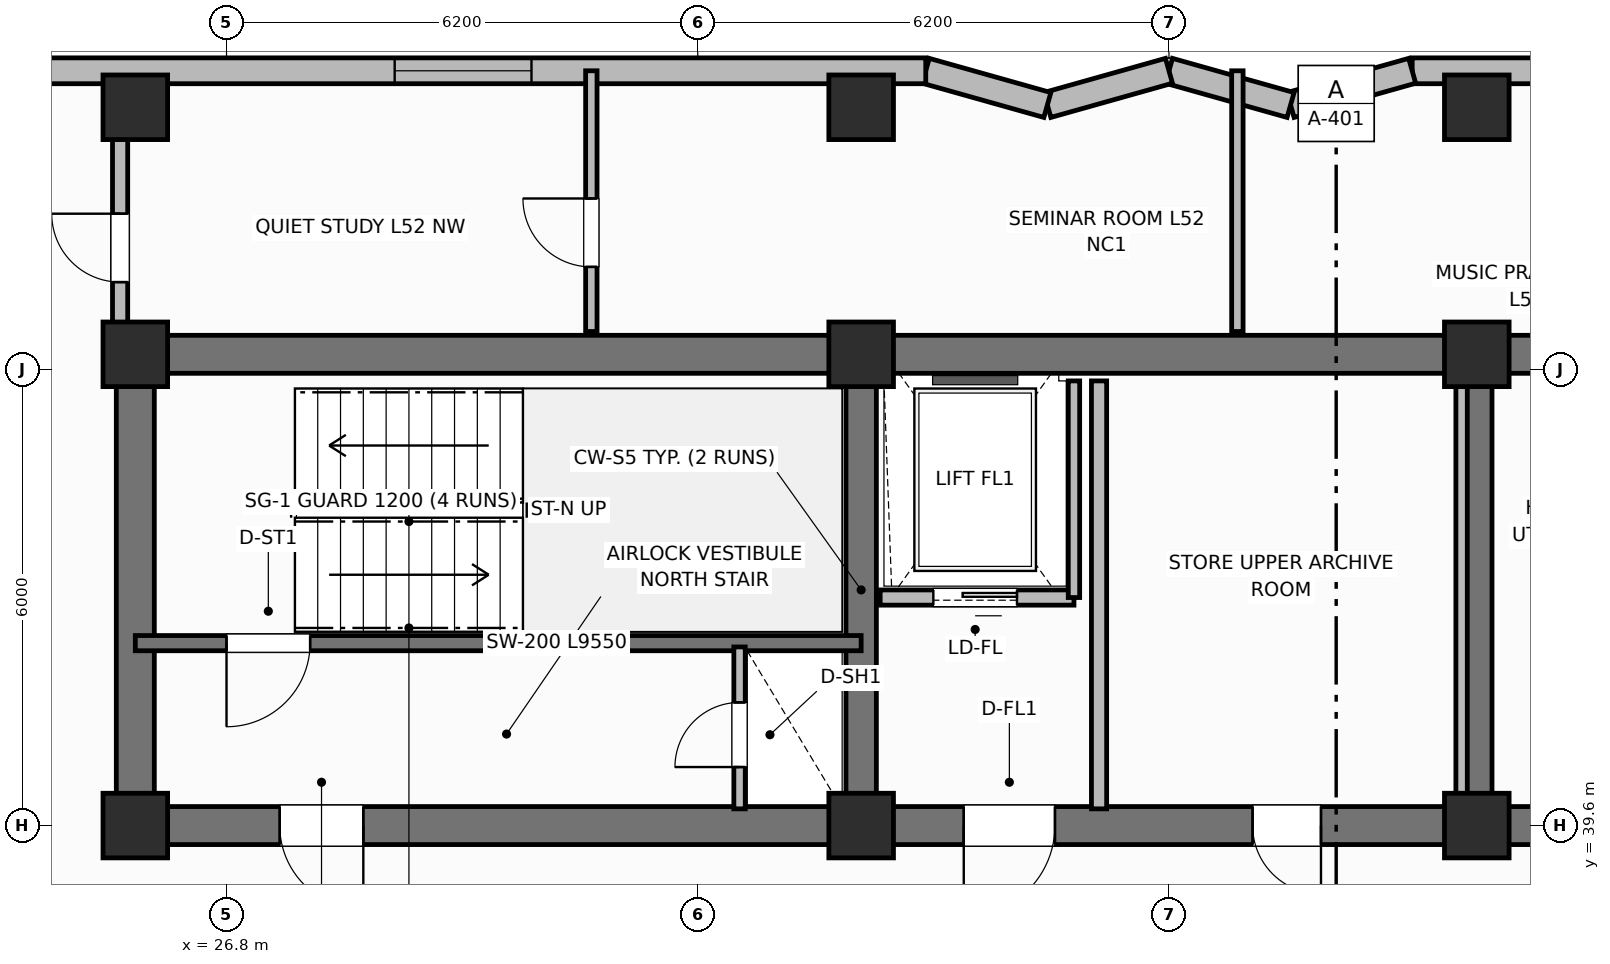
"""IFC4 building model, lengths in metres.
Left out: names, types, materials, properties, quantities, classifications, styles, units other than length and angle.
Written with IfcOpenShell. Run it as: python <this file> out.ifc"""

import sys

from ifc_helpers import new_model, si_unit, direction, frame, frame_2d, origin, origin_2d, place, context, subcontext, project, spatial, rectangle, extrude, element, fill, save


model = new_model("IFC4")
c1 = context("Model", 3, precision=1e-05, world=origin(), true_north=direction((0.0, 1.0)))
c2 = subcontext(c1, "Body", "Model", "MODEL_VIEW")
j1 = project(units=[si_unit("LENGTHUNIT", "METRE"), si_unit("PLANEANGLEUNIT", "RADIAN")], contexts=[c1])
p1 = place(None, origin())
s1 = spatial("IfcSite", under=j1, at=p1, CompositionType="ELEMENT")
p2 = place(p1, origin())
s2 = spatial("IfcBuilding", under=s1, at=p2, CompositionType="ELEMENT")
p3 = place(p2, frame((0.0, 0.0, 211.0)))
s3 = spatial("IfcBuildingStorey", under=s2, at=p3, CompositionType="ELEMENT", Elevation=211.0)
p4 = place(p3, frame((25.6, 45.8, 0.0), z_axis=(0.0, 0.0, 1.0), x_axis=(1.0, 0.0, 0.0)))
e1 = element("IfcWall", 1, at=p4, inside=s3, PredefinedType="SHEAR", context=c2, shape_type="SweptSolid", body=[
    extrude(rectangle(XDim=27.2, YDim=0.5, at=frame_2d((13.6, 0.0))), origin(), (0.0, 0.0, 1.0), 3.7),
])
p5 = place(p3, frame((25.6, 39.85, 0.0), z_axis=(0.0, 0.0, 1.0), x_axis=(0.0, 1.0, 0.0)))
e2 = element("IfcWall", 2, at=p5, inside=s3, PredefinedType="SHEAR", context=c2, shape_type="SweptSolid", body=[
    extrude(rectangle(XDim=5.7, YDim=0.5, at=frame_2d((2.85, 0.0))), origin(), (0.0, 0.0, 1.0), 3.7),
])
p6 = place(p3, frame((52.8, 39.6, 0.0), z_axis=(0.0, 0.0, 1.0), x_axis=(-1.0, 0.0, 0.0)))
e3 = element("IfcWall", 3, at=p6, inside=s3, PredefinedType="SHEAR", context=c2, shape_type="SweptSolid", body=[
    extrude(rectangle(XDim=27.2, YDim=0.5, at=frame_2d((13.6, 0.0))), origin(), (0.0, 0.0, 1.0), 3.7),
])
p7 = place(p6, frame((24.2, 0.0, 0.0)))
e4 = element("IfcOpeningElement", 4, at=p7, cuts=e3, PredefinedType="OPENING", context=c2, shape_type="SweptSolid", body=[
    extrude(rectangle(XDim=1.1, YDim=2.15, at=frame_2d((0.55, 1.075))), frame((0.0, 0.26, 0.0), z_axis=(0.0, -1.0, 0.0), x_axis=(1.0, 0.0, 0.0)), (0.0, 0.0, 1.0), 0.52),
])
p8 = place(p6, frame((15.1, 0.0, 0.0)))
e5 = element("IfcOpeningElement", 5, at=p8, cuts=e3, PredefinedType="OPENING", context=c2, shape_type="SweptSolid", body=[
    extrude(rectangle(XDim=1.2, YDim=2.15, at=frame_2d((0.6, 1.075))), frame((0.0, 0.26, 0.0), z_axis=(0.0, -1.0, 0.0), x_axis=(1.0, 0.0, 0.0)), (0.0, 0.0, 1.0), 0.52),
])
p9 = place(p6, frame((11.6, 0.0, 0.0)))
e6 = element("IfcOpeningElement", 6, at=p9, cuts=e3, PredefinedType="OPENING", context=c2, shape_type="SweptSolid", body=[
    extrude(rectangle(XDim=0.9, YDim=2.1, at=frame_2d((0.45, 1.05))), frame((0.0, 0.26, 0.0), z_axis=(0.0, -1.0, 0.0), x_axis=(1.0, 0.0, 0.0)), (0.0, 0.0, 1.0), 0.52),
])
p10 = place(p6, frame((7.35, 0.0, 0.0)))
e7 = element("IfcOpeningElement", 7, at=p10, cuts=e3, PredefinedType="OPENING", context=c2, shape_type="SweptSolid", body=[
    extrude(rectangle(XDim=0.85, YDim=2.1, at=frame_2d((0.425, 1.05))), frame((0.0, 0.26, 0.0), z_axis=(0.0, -1.0, 0.0), x_axis=(1.0, 0.0, 0.0)), (0.0, 0.0, 1.0), 0.52),
])
p11 = place(p6, frame((4.2, 0.0, 0.0)))
e8 = element("IfcOpeningElement", 8, at=p11, cuts=e3, PredefinedType="OPENING", context=c2, shape_type="SweptSolid", body=[
    extrude(rectangle(XDim=1.3, YDim=2.2, at=frame_2d((0.65, 1.1))), frame((0.0, 0.26, 0.0), z_axis=(0.0, -1.0, 0.0), x_axis=(1.0, 0.0, 0.0)), (0.0, 0.0, 1.0), 0.52),
])
for number, where, z_axis, x_axis in (
    (9, (35.15, 39.85, 0.0), (0.0, 0.0, 1.0), (0.0, 1.0, 0.0)),
    (10, (43.25, 39.85, 0.0), (0.0, 0.0, 1.0), (0.0, 1.0, 0.0)),
):
    element("IfcWall", number, at=place(p3, frame(where, z_axis=z_axis, x_axis=x_axis)), inside=s3, PredefinedType="SHEAR", context=c2, shape_type="SweptSolid", body=[
        extrude(rectangle(XDim=5.7, YDim=0.4, at=frame_2d((2.85, 0.0))), origin(), (0.0, 0.0, 1.0), 3.7),
    ])
for number, where, z_axis, x_axis in (
    (11, (25.6, 39.6, 0.0), (0.0, 0.0, 1.0), (1.0, 0.0, 0.0)),
    (12, (25.6, 45.8, 0.0), (0.0, 0.0, 1.0), (1.0, 0.0, 0.0)),
    (13, (35.15, 39.6, 0.0), (0.0, 0.0, 1.0), (1.0, 0.0, 0.0)),
    (14, (35.15, 45.8, 0.0), (0.0, 0.0, 1.0), (1.0, 0.0, 0.0)),
    (15, (43.25, 39.6, 0.0), (0.0, 0.0, 1.0), (1.0, 0.0, 0.0)),
    (16, (43.25, 45.8, 0.0), (0.0, 0.0, 1.0), (1.0, 0.0, 0.0)),
    (17, (25.6, 49.05, 0.0), (0.0, 0.0, 1.0), (1.0, 0.0, 0.0)),
    (18, (35.15, 49.05, 0.0), (0.0, 0.0, 1.0), (1.0, 0.0, 0.0)),
    (19, (43.25, 49.05, 0.0), (0.0, 0.0, 1.0), (1.0, 0.0, 0.0)),
):
    element("IfcColumn", number, at=place(p3, frame(where, z_axis=z_axis, x_axis=x_axis)), inside=s3, PredefinedType="COLUMN", context=c2, shape_type="SweptSolid", body=[
        extrude(rectangle(XDim=0.85, YDim=0.85, at=origin_2d()), origin(), (0.0, 0.0, 1.0), 3.7),
    ])
p12 = place(p3, frame((58.2, 49.53, 0.0), z_axis=(0.0, 0.0, 1.0), x_axis=(-1.0, 0.0, 0.0)))
e20 = element("IfcWall", 20, at=p12, inside=s3, PredefinedType="SOLIDWALL", context=c2, shape_type="SweptSolid", body=[
    extrude(rectangle(XDim=15.8, YDim=0.34, at=frame_2d((7.9, 0.0))), origin(), (0.0, 0.0, 1.0), 2.72),
])
p13 = place(p12, frame((0.863, 0.0, 0.75)))
e21 = element("IfcOpeningElement", 21, at=p13, cuts=e20, PredefinedType="OPENING", context=c2, shape_type="SweptSolid", body=[
    extrude(rectangle(XDim=1.8, YDim=1.85, at=frame_2d((0.9, 0.925))), frame((0.0, 0.18, 0.0), z_axis=(0.0, -1.0, 0.0), x_axis=(1.0, 0.0, 0.0)), (0.0, 0.0, 1.0), 0.36),
])
p14 = place(p12, frame((8.462, 0.0, 0.75)))
e22 = element("IfcOpeningElement", 22, at=p14, cuts=e20, PredefinedType="OPENING", context=c2, shape_type="SweptSolid", body=[
    extrude(rectangle(XDim=1.8, YDim=1.85, at=frame_2d((0.9, 0.925))), frame((0.0, 0.18, 0.0), z_axis=(0.0, -1.0, 0.0), x_axis=(1.0, 0.0, 0.0)), (0.0, 0.0, 1.0), 0.36),
])
p15 = place(p12, frame((11.738, 0.0, 0.75)))
e23 = element("IfcOpeningElement", 23, at=p15, cuts=e20, PredefinedType="OPENING", context=c2, shape_type="SweptSolid", body=[
    extrude(rectangle(XDim=1.8, YDim=1.85, at=frame_2d((0.9, 0.925))), frame((0.0, 0.18, 0.0), z_axis=(0.0, -1.0, 0.0), x_axis=(1.0, 0.0, 0.0)), (0.0, 0.0, 1.0), 0.36),
])
p16 = place(p3, frame((42.4, 49.53, 0.0), z_axis=(0.0, 0.0, 1.0), x_axis=(-0.962652136636, -0.270741322725, 0.0)))
e24 = element("IfcWall", 24, at=p16, inside=s3, PredefinedType="SOLIDWALL", context=c2, shape_type="SweptSolid", body=[
    extrude(rectangle(XDim=1.662, YDim=0.34, at=frame_2d((0.831, 0.0))), origin(), (0.0, 0.0, 1.0), 2.72),
])
p17 = place(p3, frame((40.8, 49.08, 0.0), z_axis=(0.0, 0.0, 1.0), x_axis=(-0.962662902433, 0.270703040766, 0.0)))
e25 = element("IfcWall", 25, at=p17, inside=s3, PredefinedType="SOLIDWALL", context=c2, shape_type="SweptSolid", body=[
    extrude(rectangle(XDim=1.662, YDim=0.34, at=frame_2d((0.831, 0.0))), origin(), (0.0, 0.0, 1.0), 2.72),
])
p18 = place(p3, frame((39.2, 49.53, 0.0), z_axis=(0.0, 0.0, 1.0), x_axis=(-0.962652136636, -0.270741322725, 0.0)))
e26 = element("IfcWall", 26, at=p18, inside=s3, PredefinedType="SOLIDWALL", context=c2, shape_type="SweptSolid", body=[
    extrude(rectangle(XDim=1.662, YDim=0.34, at=frame_2d((0.831, 0.0))), origin(), (0.0, 0.0, 1.0), 2.72),
])
p19 = place(p3, frame((37.6, 49.08, 0.0), z_axis=(0.0, 0.0, 1.0), x_axis=(-0.962662902433, 0.270703040766, 0.0)))
e27 = element("IfcWall", 27, at=p19, inside=s3, PredefinedType="SOLIDWALL", context=c2, shape_type="SweptSolid", body=[
    extrude(rectangle(XDim=1.662, YDim=0.34, at=frame_2d((0.831, 0.0))), origin(), (0.0, 0.0, 1.0), 2.72),
])
p20 = place(p3, frame((36.0, 49.53, 0.0), z_axis=(0.0, 0.0, 1.0), x_axis=(-1.0, 0.0, 0.0)))
e28 = element("IfcWall", 28, at=p20, inside=s3, PredefinedType="SOLIDWALL", context=c2, shape_type="SweptSolid", body=[
    extrude(rectangle(XDim=15.8, YDim=0.34, at=frame_2d((7.9, 0.0))), origin(), (0.0, 0.0, 1.0), 2.72),
])
p21 = place(p20, frame((5.188, 0.0, 0.75)))
e29 = element("IfcOpeningElement", 29, at=p21, cuts=e28, PredefinedType="OPENING", context=c2, shape_type="SweptSolid", body=[
    extrude(rectangle(XDim=1.8, YDim=1.85, at=frame_2d((0.9, 0.925))), frame((0.0, 0.18, 0.0), z_axis=(0.0, -1.0, 0.0), x_axis=(1.0, 0.0, 0.0)), (0.0, 0.0, 1.0), 0.36),
])
p22 = place(p20, frame((13.137, 0.0, 0.75)))
e30 = element("IfcOpeningElement", 30, at=p22, cuts=e28, PredefinedType="OPENING", context=c2, shape_type="SweptSolid", body=[
    extrude(rectangle(XDim=1.8, YDim=1.85, at=frame_2d((0.9, 0.925))), frame((0.0, 0.18, 0.0), z_axis=(0.0, -1.0, 0.0), x_axis=(1.0, 0.0, 0.0)), (0.0, 0.0, 1.0), 0.36),
])
p23 = place(p3, frame((35.15, 42.0, 0.0), z_axis=(0.0, 0.0, 1.0), x_axis=(-1.0, 0.0, 0.0)))
e31 = element("IfcWall", 31, at=p23, inside=s3, PredefinedType="SHEAR", context=c2, shape_type="SweptSolid", body=[
    extrude(rectangle(XDim=9.55, YDim=0.2, at=frame_2d((4.775, 0.0))), origin(), (0.0, 0.0, 1.0), 3.7),
])
p24 = place(p23, frame((7.25, 0.0, 0.0)))
e32 = element("IfcOpeningElement", 32, at=p24, cuts=e31, PredefinedType="OPENING", context=c2, shape_type="SweptSolid", body=[
    extrude(rectangle(XDim=1.1, YDim=2.15, at=frame_2d((0.55, 1.075))), frame((0.0, 0.11, 0.0), z_axis=(0.0, -1.0, 0.0), x_axis=(1.0, 0.0, 0.0)), (0.0, 0.0, 1.0), 0.22),
])
p25 = place(p3, frame((33.55, 39.82, 0.0), z_axis=(0.0, 0.0, 1.0), x_axis=(0.0, 1.0, 0.0)))
e33 = element("IfcWall", 33, at=p25, inside=s3, PredefinedType="PARTITIONING", context=c2, shape_type="SweptSolid", body=[
    extrude(rectangle(XDim=2.13, YDim=0.15, at=frame_2d((1.065, 0.0))), origin(), (0.0, 0.0, 1.0), 2.55),
])
p26 = place(p25, frame((0.55, 0.0, 0.0)))
e34 = element("IfcOpeningElement", 34, at=p26, cuts=e33, PredefinedType="OPENING", context=c2, shape_type="SweptSolid", body=[
    extrude(rectangle(XDim=0.85, YDim=2.05, at=frame_2d((0.425, 1.025))), frame((0.0, 0.085, 0.0), z_axis=(0.0, -1.0, 0.0), x_axis=(1.0, 0.0, 0.0)), (0.0, 0.0, 1.0), 0.17),
])
p27 = place(p3, frame((37.95, 42.6, 0.0), z_axis=(0.0, 0.0, 1.0), x_axis=(-1.0, 0.0, 0.0)))
e35 = element("IfcWall", 35, at=p27, inside=s3, PredefinedType="PARTITIONING", context=c2, shape_type="SweptSolid", body=[
    extrude(rectangle(XDim=2.55, YDim=0.2, at=frame_2d((1.275, 0.0))), origin(), (0.0, 0.0, 1.0), 2.32),
])
p28 = place(p27, frame((0.75, 0.0, 0.0)))
e36 = element("IfcOpeningElement", 36, at=p28, cuts=e35, PredefinedType="OPENING", context=c2, shape_type="SweptSolid", body=[
    extrude(rectangle(XDim=1.1, YDim=2.15, at=frame_2d((0.55, 1.075))), frame((0.0, 0.11, 0.0), z_axis=(0.0, -1.0, 0.0), x_axis=(1.0, 0.0, 0.0)), (0.0, 0.0, 1.0), 0.22),
])
p29 = place(p3, frame((37.95, 42.6, 0.0), z_axis=(0.0, 0.0, 1.0), x_axis=(0.0, 1.0, 0.0)))
e37 = element("IfcWall", 37, at=p29, inside=s3, PredefinedType="PARTITIONING", context=c2, shape_type="SweptSolid", body=[
    extrude(rectangle(XDim=2.85, YDim=0.15, at=frame_2d((1.425, 0.0))), origin(), (0.0, 0.0, 1.0), 2.55),
])
p30 = place(p3, frame((38.28, 39.82, 0.0), z_axis=(0.0, 0.0, 1.0), x_axis=(0.0, 1.0, 0.0)))
e38 = element("IfcWall", 38, at=p30, inside=s3, PredefinedType="PARTITIONING", context=c2, shape_type="SweptSolid", body=[
    extrude(rectangle(XDim=5.63, YDim=0.2, at=frame_2d((2.815, 0.0))), origin(), (0.0, 0.0, 1.0), 2.55),
])
p31 = place(p3, frame((43.05, 39.82, 0.0), z_axis=(0.0, 0.0, 1.0), x_axis=(0.0, 1.0, 0.0)))
e39 = element("IfcWall", 39, at=p31, inside=s3, PredefinedType="PARTITIONING", context=c2, shape_type="SweptSolid", body=[
    extrude(rectangle(XDim=5.63, YDim=0.15, at=frame_2d((2.815, 0.0))), origin(), (0.0, 0.0, 1.0), 2.55),
])
p32 = place(p3, frame((31.6, 46.1, 0.0), z_axis=(0.0, 0.0, 1.0), x_axis=(0.0, 1.0, 0.0)))
e40 = element("IfcWall", 40, at=p32, inside=s3, PredefinedType="PARTITIONING", context=c2, shape_type="SweptSolid", body=[
    extrude(rectangle(XDim=3.43, YDim=0.15, at=frame_2d((1.715, 0.0))), origin(), (0.0, 0.0, 1.0), 2.55),
])
p33 = place(p32, frame((0.85, 0.0, 0.0)))
e41 = element("IfcOpeningElement", 41, at=p33, cuts=e40, PredefinedType="OPENING", context=c2, shape_type="SweptSolid", body=[
    extrude(rectangle(XDim=0.9, YDim=2.1, at=frame_2d((0.45, 1.05))), frame((0.0, 0.085, 0.0), z_axis=(0.0, -1.0, 0.0), x_axis=(1.0, 0.0, 0.0)), (0.0, 0.0, 1.0), 0.17),
])
p34 = place(p3, frame((40.1, 46.1, 0.0), z_axis=(0.0, 0.0, 1.0), x_axis=(0.0, 1.0, 0.0)))
e42 = element("IfcWall", 42, at=p34, inside=s3, PredefinedType="PARTITIONING", context=c2, shape_type="SweptSolid", body=[
    extrude(rectangle(XDim=3.43, YDim=0.15, at=frame_2d((1.715, 0.0))), origin(), (0.0, 0.0, 1.0), 2.55),
])
p35 = place(p3, frame((25.4, 46.1, 0.0), z_axis=(0.0, 0.0, 1.0), x_axis=(0.0, 1.0, 0.0)))
e43 = element("IfcWall", 43, at=p35, inside=s3, PredefinedType="PARTITIONING", context=c2, shape_type="SweptSolid", body=[
    extrude(rectangle(XDim=2.73, YDim=0.2, at=frame_2d((1.365, 0.0))), origin(), (0.0, 0.0, 1.0), 2.55),
])
p36 = place(p35, frame((0.65, 0.0, 0.0)))
e44 = element("IfcOpeningElement", 44, at=p36, cuts=e43, PredefinedType="OPENING", context=c2, shape_type="SweptSolid", body=[
    extrude(rectangle(XDim=0.9, YDim=2.1, at=frame_2d((0.45, 1.05))), frame((0.0, 0.11, 0.0), z_axis=(0.0, -1.0, 0.0), x_axis=(1.0, 0.0, 0.0)), (0.0, 0.0, 1.0), 0.22),
])
p37 = place(p21, origin())
e45 = element("IfcWindow", 45, at=p37, inside=s3, PartitioningType="SINGLE_PANEL", PredefinedType="WINDOW", context=c2, shape_type="SweptSolid", body=[
    extrude(rectangle(XDim=1.8, YDim=1.85, at=frame_2d((0.9, 0.925))), frame((0.0, 0.03, 0.0), z_axis=(0.0, -1.0, 0.0), x_axis=(1.0, 0.0, 0.0)), (0.0, 0.0, 1.0), 0.06),
])
fill(e29, e45)
p38 = place(p24, origin())
e46 = element("IfcDoor", 46, at=p38, inside=s3, OperationType="SINGLE_SWING_RIGHT", PredefinedType="DOOR", context=c2, shape_type="SweptSolid", body=[
    extrude(rectangle(XDim=1.1, YDim=2.15, at=frame_2d((0.55, 1.075))), frame((0.0, 0.025, 0.0), z_axis=(0.0, -1.0, 0.0), x_axis=(1.0, 0.0, 0.0)), (0.0, 0.0, 1.0), 0.05),
])
fill(e32, e46)
p39 = place(p26, origin())
e47 = element("IfcDoor", 47, at=p39, inside=s3, OperationType="SINGLE_SWING_LEFT", PredefinedType="TRAPDOOR", context=c2, shape_type="SweptSolid", body=[
    extrude(rectangle(XDim=0.85, YDim=2.05, at=frame_2d((0.425, 1.025))), frame((0.0, 0.025, 0.0), z_axis=(0.0, -1.0, 0.0), x_axis=(1.0, 0.0, 0.0)), (0.0, 0.0, 1.0), 0.05),
])
fill(e34, e47)
p40 = place(p28, origin())
e48 = element("IfcDoor", 48, at=p40, inside=s3, OperationType="SLIDING_TO_LEFT", PredefinedType="DOOR", context=c2, shape_type="SweptSolid", body=[
    extrude(rectangle(XDim=1.1, YDim=2.15, at=frame_2d((0.55, 1.075))), frame((0.0, 0.025, 0.0), z_axis=(0.0, -1.0, 0.0), x_axis=(1.0, 0.0, 0.0)), (0.0, 0.0, 1.0), 0.05),
])
fill(e36, e48)
p41 = place(p33, origin())
e49 = element("IfcDoor", 49, at=p41, inside=s3, OperationType="SINGLE_SWING_RIGHT", PredefinedType="DOOR", context=c2, shape_type="SweptSolid", body=[
    extrude(rectangle(XDim=0.9, YDim=2.1, at=frame_2d((0.45, 1.05))), frame((0.0, 0.025, 0.0), z_axis=(0.0, -1.0, 0.0), x_axis=(1.0, 0.0, 0.0)), (0.0, 0.0, 1.0), 0.05),
])
fill(e41, e49)
p42 = place(p36, origin())
e50 = element("IfcDoor", 50, at=p42, inside=s3, OperationType="SINGLE_SWING_RIGHT", PredefinedType="DOOR", context=c2, shape_type="SweptSolid", body=[
    extrude(rectangle(XDim=0.9, YDim=2.1, at=frame_2d((0.45, 1.05))), frame((0.0, 0.025, 0.0), z_axis=(0.0, -1.0, 0.0), x_axis=(1.0, 0.0, 0.0)), (0.0, 0.0, 1.0), 0.05),
])
fill(e44, e50)
p43 = place(p7, origin())
e51 = element("IfcDoor", 51, at=p43, inside=s3, OperationType="SINGLE_SWING_LEFT", PredefinedType="DOOR", context=c2, shape_type="SweptSolid", body=[
    extrude(rectangle(XDim=1.1, YDim=2.15, at=frame_2d((0.55, 1.075))), frame((0.0, 0.025, 0.0), z_axis=(0.0, -1.0, 0.0), x_axis=(1.0, 0.0, 0.0)), (0.0, 0.0, 1.0), 0.05),
])
fill(e4, e51)
p44 = place(p8, origin())
e52 = element("IfcDoor", 52, at=p44, inside=s3, OperationType="SINGLE_SWING_RIGHT", PredefinedType="DOOR", context=c2, shape_type="SweptSolid", body=[
    extrude(rectangle(XDim=1.2, YDim=2.15, at=frame_2d((0.6, 1.075))), frame((0.0, 0.025, 0.0), z_axis=(0.0, -1.0, 0.0), x_axis=(1.0, 0.0, 0.0)), (0.0, 0.0, 1.0), 0.05),
])
fill(e5, e52)
p45 = place(p9, origin())
e53 = element("IfcDoor", 53, at=p45, inside=s3, OperationType="SINGLE_SWING_LEFT", PredefinedType="DOOR", context=c2, shape_type="SweptSolid", body=[
    extrude(rectangle(XDim=0.9, YDim=2.1, at=frame_2d((0.45, 1.05))), frame((0.0, 0.025, 0.0), z_axis=(0.0, -1.0, 0.0), x_axis=(1.0, 0.0, 0.0)), (0.0, 0.0, 1.0), 0.05),
])
fill(e6, e53)
save(model, sys.argv[1])
